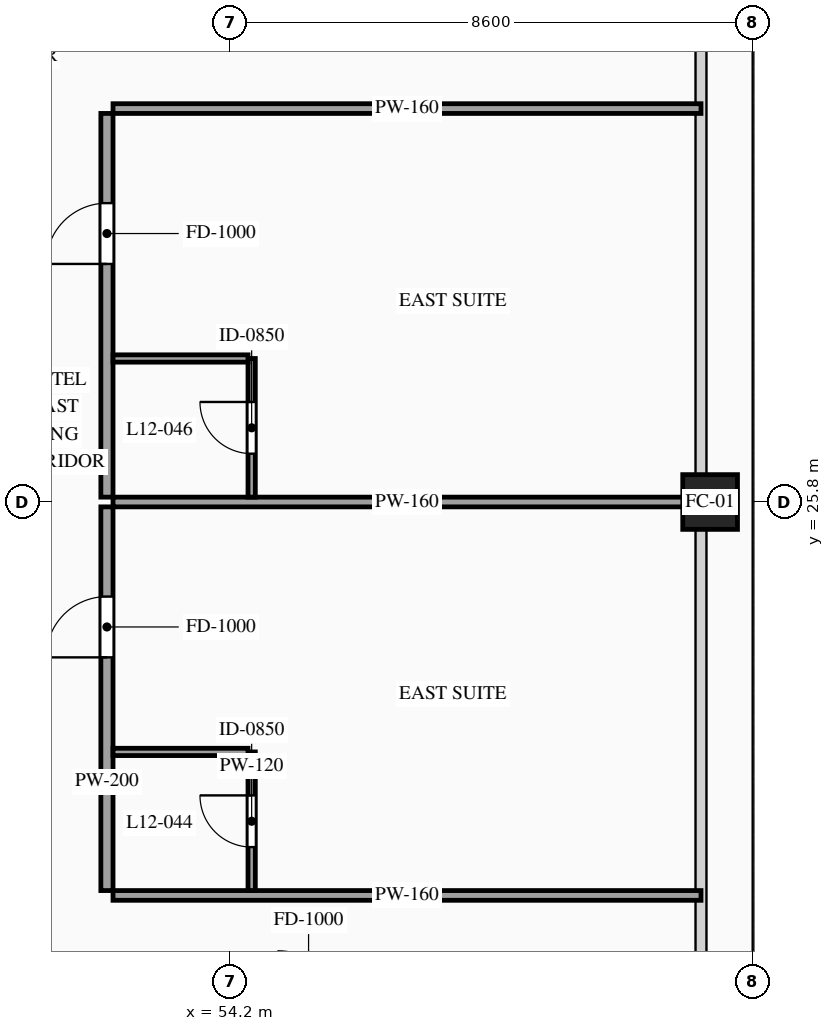
"""IFC4 building model, lengths in metres.
Left out: names, types, materials, properties, quantities, classifications, styles, units other than length and angle.
Written with IfcOpenShell. Run it as: python <this file> out.ifc"""

import sys

from ifc_helpers import new_model, si_unit, direction, frame, frame_2d, origin, origin_2d, place, context, subcontext, project, spatial, rectangle, hollow_rectangle, extrude, source, transform, mapped, element, fill, save


model = new_model("IFC4")
c1 = context("Model", 3, precision=1e-05, world=origin(), true_north=direction((0.0, 1.0)))
c2 = subcontext(c1, "Body", "Model", "MODEL_VIEW")
j1 = project(units=[si_unit("LENGTHUNIT", "METRE"), si_unit("PLANEANGLEUNIT", "RADIAN")], contexts=[c1])
p1 = place(None, origin())
s1 = spatial("IfcSite", under=j1, at=p1, CompositionType="ELEMENT")
p2 = place(p1, origin())
s2 = spatial("IfcBuilding", under=s1, at=p2, CompositionType="ELEMENT")
p3 = place(p2, frame((0.0, 0.0, 49.6)))
s3 = spatial("IfcBuildingStorey", under=s2, at=p3, CompositionType="ELEMENT", Elevation=49.6)
m1 = source(origin(), c2, "Body", "SweptSolid", [
    extrude(hollow_rectangle(XDim=0.9, YDim=0.9, WallThickness=0.042, at=origin_2d()), origin(), (0.0, 0.0, 1.0), 3.6),
])
p4 = place(p3, frame((62.1, 25.8, 0.0), z_axis=(0.0, 0.0, 1.0), x_axis=(1.0, 0.0, 0.0)))
e1 = element("IfcColumn", 1, at=p4, inside=s3, PredefinedType="COLUMN", context=c2, shape_type="MappedRepresentation", body=[
    mapped(m1, transform((0.0, 0.0, 0.0), scale=1.0)),
])
p5 = place(p3, frame((52.18, 19.41, 0.0), z_axis=(0.0, 0.0, 1.0), x_axis=(0.0, 1.0, 0.0)))
e2 = element("IfcWall", 2, at=p5, inside=s3, PredefinedType="PARTITIONING", context=c2, shape_type="SweptSolid", body=[
    extrude(rectangle(XDim=6.31, YDim=0.2, at=frame_2d((3.155, 0.0))), origin(), (0.0, 0.0, 1.0), 3.38),
])
p6 = place(p5, frame((3.835, 0.0, 0.0)))
e3 = element("IfcOpeningElement", 3, at=p6, cuts=e2, PredefinedType="OPENING", context=c2, shape_type="SweptSolid", body=[
    extrude(rectangle(XDim=1.0, YDim=2.2, at=frame_2d((0.5, 1.1))), frame((0.0, 0.115, 0.0), z_axis=(0.0, -1.0, 0.0), x_axis=(1.0, 0.0, 0.0)), (0.0, 0.0, 1.0), 0.23),
])
m2 = source(origin(), c2, "Body", "SweptSolid", [
    extrude(rectangle(XDim=9.67, YDim=0.16, at=frame_2d((4.835, 0.0))), origin(), (0.0, 0.0, 1.0), 2.575),
])
p7 = place(p3, frame((52.28, 25.8, 0.0), z_axis=(0.0, 0.0, 1.0), x_axis=(1.0, 0.0, 0.0)))
e4 = element("IfcWall", 4, at=p7, inside=s3, PredefinedType="PARTITIONING", context=c2, shape_type="MappedRepresentation", body=[
    mapped(m2, transform((0.0, 0.0, 0.0), scale=1.0)),
])
m3 = source(origin(), c2, "Body", "SweptSolid", [
    extrude(rectangle(XDim=9.67, YDim=0.16, at=frame_2d((4.835, 0.0))), origin(), (0.0, 0.0, 1.0), 2.875),
])
p8 = place(p3, frame((52.28, 19.33, 0.0), z_axis=(0.0, 0.0, 1.0), x_axis=(1.0, 0.0, 0.0)))
e5 = element("IfcWall", 5, at=p8, inside=s3, PredefinedType="PARTITIONING", context=c2, shape_type="MappedRepresentation", body=[
    mapped(m3, transform((0.0, 0.0, 0.0), scale=1.0)),
])
p9 = place(p3, frame((54.56, 19.41, 0.0), z_axis=(0.0, 0.0, 1.0), x_axis=(0.0, 1.0, 0.0)))
e6 = element("IfcWall", 6, at=p9, inside=s3, PredefinedType="PARTITIONING", context=c2, shape_type="SweptSolid", body=[
    extrude(rectangle(XDim=2.28, YDim=0.12, at=frame_2d((1.14, 0.0))), origin(), (0.0, 0.0, 1.0), 3.38),
])
p10 = place(p9, frame((0.715, 0.0, 0.0)))
e7 = element("IfcOpeningElement", 7, at=p10, cuts=e6, PredefinedType="OPENING", context=c2, shape_type="SweptSolid", body=[
    extrude(rectangle(XDim=0.85, YDim=2.1, at=frame_2d((0.425, 1.05))), frame((0.0, 0.075, 0.0), z_axis=(0.0, -1.0, 0.0), x_axis=(1.0, 0.0, 0.0)), (0.0, 0.0, 1.0), 0.15),
])
m4 = source(origin(), c2, "Body", "SweptSolid", [
    extrude(rectangle(XDim=2.22, YDim=0.12, at=frame_2d((1.11, 0.0))), origin(), (0.0, 0.0, 1.0), 3.38),
])
p11 = place(p3, frame((52.28, 21.69, 0.0), z_axis=(0.0, 0.0, 1.0), x_axis=(1.0, 0.0, 0.0)))
e8 = element("IfcWall", 8, at=p11, inside=s3, PredefinedType="PARTITIONING", context=c2, shape_type="MappedRepresentation", body=[
    mapped(m4, transform((0.0, 0.0, 0.0), scale=1.0)),
])
p12 = place(p3, frame((52.18, 25.88, 0.0), z_axis=(0.0, 0.0, 1.0), x_axis=(0.0, 1.0, 0.0)))
e9 = element("IfcWall", 9, at=p12, inside=s3, PredefinedType="PARTITIONING", context=c2, shape_type="SweptSolid", body=[
    extrude(rectangle(XDim=6.31, YDim=0.2, at=frame_2d((3.155, 0.0))), origin(), (0.0, 0.0, 1.0), 3.38),
])
p13 = place(p12, frame((3.835, 0.0, 0.0)))
e10 = element("IfcOpeningElement", 10, at=p13, cuts=e9, PredefinedType="OPENING", context=c2, shape_type="SweptSolid", body=[
    extrude(rectangle(XDim=1.0, YDim=2.2, at=frame_2d((0.5, 1.1))), frame((0.0, 0.115, 0.0), z_axis=(0.0, -1.0, 0.0), x_axis=(1.0, 0.0, 0.0)), (0.0, 0.0, 1.0), 0.23),
])
p14 = place(p3, frame((52.28, 32.27, 0.0), z_axis=(0.0, 0.0, 1.0), x_axis=(1.0, 0.0, 0.0)))
e11 = element("IfcWall", 11, at=p14, inside=s3, PredefinedType="PARTITIONING", context=c2, shape_type="MappedRepresentation", body=[
    mapped(m3, transform((0.0, 0.0, 0.0), scale=1.0)),
])
p15 = place(p3, frame((54.56, 25.88, 0.0), z_axis=(0.0, 0.0, 1.0), x_axis=(0.0, 1.0, 0.0)))
e12 = element("IfcWall", 12, at=p15, inside=s3, PredefinedType="PARTITIONING", context=c2, shape_type="SweptSolid", body=[
    extrude(rectangle(XDim=2.28, YDim=0.12, at=frame_2d((1.14, 0.0))), origin(), (0.0, 0.0, 1.0), 3.38),
])
p16 = place(p15, frame((0.715, 0.0, 0.0)))
e13 = element("IfcOpeningElement", 13, at=p16, cuts=e12, PredefinedType="OPENING", context=c2, shape_type="SweptSolid", body=[
    extrude(rectangle(XDim=0.85, YDim=2.1, at=frame_2d((0.425, 1.05))), frame((0.0, 0.075, 0.0), z_axis=(0.0, -1.0, 0.0), x_axis=(1.0, 0.0, 0.0)), (0.0, 0.0, 1.0), 0.15),
])
p17 = place(p3, frame((52.28, 28.16, 0.0), z_axis=(0.0, 0.0, 1.0), x_axis=(1.0, 0.0, 0.0)))
e14 = element("IfcWall", 14, at=p17, inside=s3, PredefinedType="PARTITIONING", context=c2, shape_type="MappedRepresentation", body=[
    mapped(m4, transform((0.0, 0.0, 0.0), scale=1.0)),
])
m5 = source(origin(), c2, "Body", "SweptSolid", [
    extrude(rectangle(XDim=1.0, YDim=2.2, at=frame_2d((0.5, 1.1))), frame((0.0, 0.025, 0.0), z_axis=(0.0, -1.0, 0.0), x_axis=(1.0, 0.0, 0.0)), (0.0, 0.0, 1.0), 0.05),
])
p18 = place(p6, origin())
e15 = element("IfcDoor", 15, at=p18, inside=s3, OperationType="SINGLE_SWING_LEFT", PredefinedType="DOOR", context=c2, shape_type="MappedRepresentation", body=[
    mapped(m5, transform((0.0, 0.0, 0.0), scale=1.0)),
])
fill(e3, e15)
m6 = source(origin(), c2, "Body", "SweptSolid", [
    extrude(rectangle(XDim=0.85, YDim=2.1, at=frame_2d((0.425, 1.05))), frame((0.0, 0.025, 0.0), z_axis=(0.0, -1.0, 0.0), x_axis=(1.0, 0.0, 0.0)), (0.0, 0.0, 1.0), 0.05),
])
p19 = place(p10, origin())
e16 = element("IfcDoor", 16, at=p19, inside=s3, OperationType="SINGLE_SWING_RIGHT", PredefinedType="DOOR", context=c2, shape_type="MappedRepresentation", body=[
    mapped(m6, transform((0.0, 0.0, 0.0), scale=1.0)),
])
fill(e7, e16)
p20 = place(p13, origin())
e17 = element("IfcDoor", 17, at=p20, inside=s3, OperationType="SINGLE_SWING_LEFT", PredefinedType="DOOR", context=c2, shape_type="MappedRepresentation", body=[
    mapped(m5, transform((0.0, 0.0, 0.0), scale=1.0)),
])
fill(e10, e17)
p21 = place(p16, origin())
e18 = element("IfcDoor", 18, at=p21, inside=s3, OperationType="SINGLE_SWING_RIGHT", PredefinedType="DOOR", context=c2, shape_type="MappedRepresentation", body=[
    mapped(m6, transform((0.0, 0.0, 0.0), scale=1.0)),
])
fill(e13, e18)
save(model, sys.argv[1])
